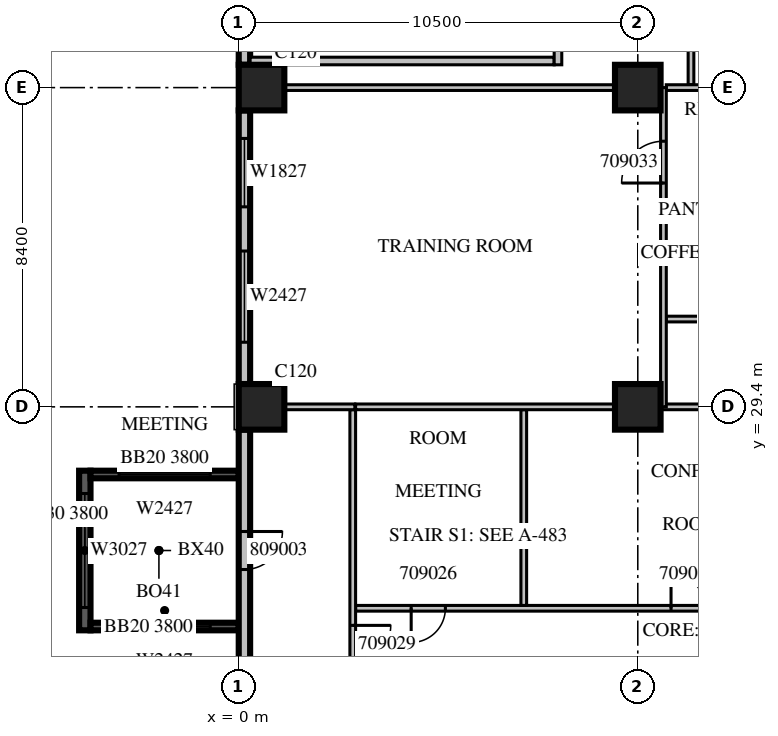
"""IFC4 building model, lengths in metres.
Left out: names, types, materials, properties, quantities, classifications, styles, units other than length and angle.
Written with IfcOpenShell. Run it as: python <this file> out.ifc"""

import sys

from ifc_helpers import new_model, si_unit, direction, frame, frame_2d, origin, origin_2d, place, context, subcontext, project, spatial, rectangle, extrude, source, transform, mapped, element, fill, save


model = new_model("IFC4")
c1 = context("Model", 3, precision=1e-05, world=origin(), true_north=direction((0.0, 1.0)))
c2 = subcontext(c1, "Body", "Model", "MODEL_VIEW")
j1 = project(units=[si_unit("LENGTHUNIT", "METRE"), si_unit("PLANEANGLEUNIT", "RADIAN")], contexts=[c1])
p1 = place(None, origin())
s1 = spatial("IfcSite", under=j1, at=p1, CompositionType="ELEMENT")
p2 = place(p1, origin())
s2 = spatial("IfcBuilding", under=s1, at=p2, CompositionType="ELEMENT")
p3 = place(p2, frame((0.0, 0.0, 48.9)))
s3 = spatial("IfcBuildingStorey", under=s2, at=p3, CompositionType="ELEMENT", Elevation=48.9)
m1 = source(origin(), c2, "Body", "SweptSolid", [
    extrude(rectangle(XDim=1.2, YDim=1.2, at=origin_2d()), origin(), (0.0, 0.0, 1.0), 4.2),
])
for number, where, z_axis, x_axis in (
    (1, (0.6, 29.4, 0.0), (0.0, 0.0, 1.0), (1.0, 0.0, 0.0)),
    (2, (10.5, 29.4, 0.0), (0.0, 0.0, 1.0), (1.0, 0.0, 0.0)),
    (3, (0.6, 37.8, 0.0), (0.0, 0.0, 1.0), (1.0, 0.0, 0.0)),
    (4, (10.5, 37.8, 0.0), (0.0, 0.0, 1.0), (1.0, 0.0, 0.0)),
):
    element("IfcColumn", number, at=place(p3, frame(where, z_axis=z_axis, x_axis=x_axis)), inside=s3, PredefinedType="COLUMN", context=c2, shape_type="MappedRepresentation", body=[
        mapped(m1, transform((0.0, 0.0, 0.0), scale=1.0)),
    ])
p4 = place(p3, frame((-4.05, 27.72, 0.0), z_axis=(0.0, 0.0, 1.0), x_axis=(0.0, -1.0, 0.0)))
e5 = element("IfcWall", 5, at=p4, inside=s3, PredefinedType="SOLIDWALL", context=c2, shape_type="SweptSolid", body=[
    extrude(rectangle(XDim=4.2, YDim=0.3, at=frame_2d((2.1, 0.0))), origin(), (0.0, 0.0, 1.0), 3.8),
])
m2 = source(origin(), c2, "Body", "SweptSolid", [
    extrude(rectangle(XDim=3.0, YDim=2.7, at=frame_2d((1.5, 1.35))), frame((0.0, 0.16, 0.0), z_axis=(0.0, -1.0, 0.0), x_axis=(1.0, 0.0, 0.0)), (0.0, 0.0, 1.0), 0.32),
])
p5 = place(p4, frame((0.6, 0.0, 0.6)))
e6 = element("IfcOpeningElement", 6, at=p5, cuts=e5, PredefinedType="OPENING", context=c2, shape_type="MappedRepresentation", body=[
    mapped(m2, transform((0.0, 0.0, 0.0), scale=1.0)),
])
m3 = source(origin(), c2, "Body", "SweptSolid", [
    extrude(rectangle(XDim=3.9, YDim=0.2, at=frame_2d((1.95, 0.0))), origin(), (0.0, 0.0, 1.0), 3.8),
])
p6 = place(p3, frame((0.0, 27.62, 0.0), z_axis=(0.0, 0.0, 1.0), x_axis=(-1.0, 0.0, 0.0)))
e7 = element("IfcWall", 7, at=p6, inside=s3, PredefinedType="SOLIDWALL", context=c2, shape_type="MappedRepresentation", body=[
    mapped(m3, transform((0.0, 0.0, 0.0), scale=1.0)),
])
m4 = source(origin(), c2, "Body", "SweptSolid", [
    extrude(rectangle(XDim=2.4, YDim=2.7, at=frame_2d((1.2, 1.35))), frame((0.0, 0.11, 0.0), z_axis=(0.0, -1.0, 0.0), x_axis=(1.0, 0.0, 0.0)), (0.0, 0.0, 1.0), 0.22),
])
p7 = place(p6, frame((0.75, 0.0, 0.6)))
e8 = element("IfcOpeningElement", 8, at=p7, cuts=e7, PredefinedType="OPENING", context=c2, shape_type="MappedRepresentation", body=[
    mapped(m4, transform((0.0, 0.0, 0.0), scale=1.0)),
])
p8 = place(p3, frame((0.0, 23.62, 0.0), z_axis=(0.0, 0.0, 1.0), x_axis=(-1.0, 0.0, 0.0)))
e9 = element("IfcWall", 9, at=p8, inside=s3, PredefinedType="SOLIDWALL", context=c2, shape_type="MappedRepresentation", body=[
    mapped(m3, transform((0.0, 0.0, 0.0), scale=1.0)),
])
p9 = place(p8, frame((0.75, 0.0, 0.6)))
e10 = element("IfcOpeningElement", 10, at=p9, cuts=e9, PredefinedType="OPENING", context=c2, shape_type="MappedRepresentation", body=[
    mapped(m4, transform((0.0, 0.0, 0.0), scale=1.0)),
])
m5 = source(origin(), c2, "Body", "SweptSolid", [
    extrude(rectangle(XDim=1.8, YDim=0.3, at=frame_2d((0.9, 0.0))), origin(), (0.0, 0.0, 1.0), 3.8),
])
p10 = place(p3, frame((0.15, 40.2, 0.0), z_axis=(0.0, 0.0, 1.0), x_axis=(0.0, -1.0, 0.0)))
e11 = element("IfcWall", 11, at=p10, inside=s3, PredefinedType="STANDARD", context=c2, shape_type="MappedRepresentation", body=[
    mapped(m5, transform((0.0, 0.0, 0.0), scale=1.0)),
])
m6 = source(origin(), c2, "Body", "SweptSolid", [
    extrude(rectangle(XDim=7.2, YDim=0.3, at=frame_2d((3.6, 0.0))), origin(), (0.0, 0.0, 1.0), 3.8),
])
p11 = place(p3, frame((0.15, 37.2, 0.0), z_axis=(0.0, 0.0, 1.0), x_axis=(0.0, -1.0, 0.0)))
e12 = element("IfcWall", 12, at=p11, inside=s3, PredefinedType="STANDARD", context=c2, shape_type="MappedRepresentation", body=[
    mapped(m6, transform((0.0, 0.0, 0.0), scale=1.0)),
])
m7 = source(origin(), c2, "Body", "SweptSolid", [
    extrude(rectangle(XDim=1.8, YDim=2.7, at=frame_2d((0.9, 1.35))), frame((0.0, 0.16, 0.0), z_axis=(0.0, -1.0, 0.0), x_axis=(1.0, 0.0, 0.0)), (0.0, 0.0, 1.0), 0.32),
])
p12 = place(p11, frame((0.738, 0.0, 0.6)))
e13 = element("IfcOpeningElement", 13, at=p12, cuts=e12, PredefinedType="OPENING", context=c2, shape_type="MappedRepresentation", body=[
    mapped(m7, transform((0.0, 0.0, 0.0), scale=1.0)),
])
m8 = source(origin(), c2, "Body", "SweptSolid", [
    extrude(rectangle(XDim=2.4, YDim=2.7, at=frame_2d((1.2, 1.35))), frame((0.0, 0.16, 0.0), z_axis=(0.0, -1.0, 0.0), x_axis=(1.0, 0.0, 0.0)), (0.0, 0.0, 1.0), 0.32),
])
p13 = place(p11, frame((3.7, 0.0, 0.6)))
e14 = element("IfcOpeningElement", 14, at=p13, cuts=e12, PredefinedType="OPENING", context=c2, shape_type="MappedRepresentation", body=[
    mapped(m8, transform((0.0, 0.0, 0.0), scale=1.0)),
])
p14 = place(p3, frame((0.15, 28.8, 0.0), z_axis=(0.0, 0.0, 1.0), x_axis=(0.0, -1.0, 0.0)))
e15 = element("IfcWall", 15, at=p14, inside=s3, PredefinedType="STANDARD", context=c2, shape_type="MappedRepresentation", body=[
    mapped(m6, transform((0.0, 0.0, 0.0), scale=1.0)),
])
m9 = source(origin(), c2, "Body", "SweptSolid", [
    extrude(rectangle(XDim=1.0, YDim=2.1, at=frame_2d((0.5, 1.05))), frame((0.0, 0.16, 0.0), z_axis=(0.0, -1.0, 0.0), x_axis=(1.0, 0.0, 0.0)), (0.0, 0.0, 1.0), 0.32),
])
p15 = place(p14, frame((2.68, 0.0, 0.0)))
e16 = element("IfcOpeningElement", 16, at=p15, cuts=e15, PredefinedType="OPENING", context=c2, shape_type="MappedRepresentation", body=[
    mapped(m9, transform((0.0, 0.0, 0.0), scale=1.0)),
])
m10 = source(origin(), c2, "Body", "SweptSolid", [
    extrude(rectangle(XDim=8.0, YDim=0.2, at=frame_2d((4.0, 0.0))), origin(), (0.0, 0.0, 1.0), 3.8),
])
p16 = place(p3, frame((0.3, 38.5, 0.0), z_axis=(0.0, 0.0, 1.0), x_axis=(1.0, 0.0, 0.0)))
e17 = element("IfcWall", 17, at=p16, inside=s3, PredefinedType="PARTITIONING", context=c2, shape_type="MappedRepresentation", body=[
    mapped(m10, transform((0.0, 0.0, 0.0), scale=1.0)),
])
m11 = source(origin(), c2, "Body", "SweptSolid", [
    extrude(rectangle(XDim=5.45, YDim=0.2, at=frame_2d((2.725, 0.0))), origin(), (0.0, 0.0, 1.0), 3.8),
])
p17 = place(p3, frame((8.4, 38.4, 0.0), z_axis=(0.0, 0.0, 1.0), x_axis=(0.0, 1.0, 0.0)))
e18 = element("IfcWall", 18, at=p17, inside=s3, PredefinedType="PARTITIONING", context=c2, shape_type="MappedRepresentation", body=[
    mapped(m11, transform((0.0, 0.0, 0.0), scale=1.0)),
])
m12 = source(origin(), c2, "Body", "SweptSolid", [
    extrude(rectangle(XDim=1.2, YDim=2.1, at=frame_2d((0.6, 1.05))), frame((0.0, 0.11, 0.0), z_axis=(0.0, -1.0, 0.0), x_axis=(1.0, 0.0, 0.0)), (0.0, 0.0, 1.0), 0.22),
])
p18 = place(p17, frame((0.4, 0.0, 0.0)))
e19 = element("IfcOpeningElement", 19, at=p18, cuts=e18, PredefinedType="OPENING", context=c2, shape_type="MappedRepresentation", body=[
    mapped(m12, transform((0.0, 0.0, 0.0), scale=1.0)),
])
m13 = source(origin(), c2, "Body", "SweptSolid", [
    extrude(rectangle(XDim=0.9, YDim=2.1, at=frame_2d((0.45, 1.05))), frame((0.0, 0.11, 0.0), z_axis=(0.0, -1.0, 0.0), x_axis=(1.0, 0.0, 0.0)), (0.0, 0.0, 1.0), 0.22),
])
p19 = place(p17, frame((3.25, 0.0, 0.0)))
e20 = element("IfcOpeningElement", 20, at=p19, cuts=e18, PredefinedType="OPENING", context=c2, shape_type="MappedRepresentation", body=[
    mapped(m13, transform((0.0, 0.0, 0.0), scale=1.0)),
])
m14 = source(origin(), c2, "Body", "SweptSolid", [
    extrude(rectangle(XDim=11.925, YDim=0.15, at=frame_2d((5.963, 0.0))), origin(), (0.0, 0.0, 1.0), 3.8),
])
p20 = place(p3, frame((3.075, 24.1, 0.0), z_axis=(0.0, 0.0, 1.0), x_axis=(1.0, 0.0, 0.0)))
e21 = element("IfcWall", 21, at=p20, inside=s3, PredefinedType="PARTITIONING", context=c2, shape_type="MappedRepresentation", body=[
    mapped(m14, transform((0.0, 0.0, 0.0), scale=1.0)),
])
m15 = source(origin(), c2, "Body", "SweptSolid", [
    extrude(rectangle(XDim=0.9, YDim=2.1, at=frame_2d((0.45, 1.05))), frame((0.0, 0.085, 0.0), z_axis=(0.0, -1.0, 0.0), x_axis=(1.0, 0.0, 0.0)), (0.0, 0.0, 1.0), 0.17),
])
p21 = place(p20, frame((1.462, 0.0, 0.0)))
e22 = element("IfcOpeningElement", 22, at=p21, cuts=e21, PredefinedType="OPENING", context=c2, shape_type="MappedRepresentation", body=[
    mapped(m15, transform((0.0, 0.0, 0.0), scale=1.0)),
])
p22 = place(p20, frame((8.3, 0.0, 0.0)))
e23 = element("IfcOpeningElement", 23, at=p22, cuts=e21, PredefinedType="OPENING", context=c2, shape_type="MappedRepresentation", body=[
    mapped(m15, transform((0.0, 0.0, 0.0), scale=1.0)),
])
m16 = source(origin(), c2, "Body", "SweptSolid", [
    extrude(rectangle(XDim=5.15, YDim=0.15, at=frame_2d((2.575, 0.0))), origin(), (0.0, 0.0, 1.0), 3.8),
])
p23 = place(p3, frame((7.5, 24.175, 0.0), z_axis=(0.0, 0.0, 1.0), x_axis=(0.0, 1.0, 0.0)))
e24 = element("IfcWall", 24, at=p23, inside=s3, PredefinedType="PARTITIONING", context=c2, shape_type="MappedRepresentation", body=[
    mapped(m16, transform((0.0, 0.0, 0.0), scale=1.0)),
])
m17 = source(origin(), c2, "Body", "SweptSolid", [
    extrude(rectangle(XDim=6.826, YDim=0.15, at=frame_2d((3.413, 0.0))), origin(), (0.0, 0.0, 1.0), 3.8),
])
p24 = place(p3, frame((9.901, 29.4, 0.0), z_axis=(0.0, 0.0, 1.0), x_axis=(-1.0, 0.0, 0.0)))
e25 = element("IfcWall", 25, at=p24, inside=s3, PredefinedType="PARTITIONING", context=c2, shape_type="MappedRepresentation", body=[
    mapped(m17, transform((0.0, 0.0, 0.0), scale=1.0)),
])
m18 = source(origin(), c2, "Body", "SweptSolid", [
    extrude(rectangle(XDim=3.901, YDim=0.15, at=frame_2d((1.95, 0.0))), origin(), (0.0, 0.0, 1.0), 3.8),
])
p25 = place(p3, frame((15.0, 29.4, 0.0), z_axis=(0.0, 0.0, 1.0), x_axis=(-1.0, 0.0, 0.0)))
e26 = element("IfcWall", 26, at=p25, inside=s3, PredefinedType="PARTITIONING", context=c2, shape_type="MappedRepresentation", body=[
    mapped(m18, transform((0.0, 0.0, 0.0), scale=1.0)),
])
m19 = source(origin(), c2, "Body", "SweptSolid", [
    extrude(rectangle(XDim=7.125, YDim=0.15, at=frame_2d((3.562, 0.0))), origin(), (0.0, 0.0, 1.0), 3.8),
])
p26 = place(p3, frame((3.0, 29.325, 0.0), z_axis=(0.0, 0.0, 1.0), x_axis=(0.0, -1.0, 0.0)))
e27 = element("IfcWall", 27, at=p26, inside=s3, PredefinedType="PARTITIONING", context=c2, shape_type="MappedRepresentation", body=[
    mapped(m19, transform((0.0, 0.0, 0.0), scale=1.0)),
])
m20 = source(origin(), c2, "Body", "SweptSolid", [
    extrude(rectangle(XDim=1.0, YDim=2.1, at=frame_2d((0.5, 1.05))), frame((0.0, 0.085, 0.0), z_axis=(0.0, -1.0, 0.0), x_axis=(1.0, 0.0, 0.0)), (0.0, 0.0, 1.0), 0.17),
])
p27 = place(p26, frame((5.675, 0.0, 0.0)))
e28 = element("IfcOpeningElement", 28, at=p27, cuts=e27, PredefinedType="OPENING", context=c2, shape_type="MappedRepresentation", body=[
    mapped(m20, transform((0.0, 0.0, 0.0), scale=1.0)),
])
m21 = source(origin(), c2, "Body", "SweptSolid", [
    extrude(rectangle(XDim=6.45, YDim=0.15, at=frame_2d((3.225, 0.0))), origin(), (0.0, 0.0, 1.0), 3.8),
])
p28 = place(p3, frame((11.9, 44.325, 0.0), z_axis=(0.0, 0.0, 1.0), x_axis=(0.0, -1.0, 0.0)))
e29 = element("IfcWall", 29, at=p28, inside=s3, PredefinedType="PARTITIONING", context=c2, shape_type="MappedRepresentation", body=[
    mapped(m21, transform((0.0, 0.0, 0.0), scale=1.0)),
])
m22 = source(origin(), c2, "Body", "SweptSolid", [
    extrude(rectangle(XDim=3.75, YDim=0.15, at=frame_2d((1.875, 0.0))), origin(), (0.0, 0.0, 1.0), 3.8),
])
for number, where, z_axis, x_axis in (
    (30, (15.0, 31.71, 0.0), (0.0, 0.0, 1.0), (-1.0, 0.0, 0.0)),
    (31, (15.0, 34.403, 0.0), (0.0, 0.0, 1.0), (-1.0, 0.0, 0.0)),
):
    element("IfcWall", number, at=place(p3, frame(where, z_axis=z_axis, x_axis=x_axis)), inside=s3, PredefinedType="PARTITIONING", context=c2, shape_type="MappedRepresentation", body=[
        mapped(m22, transform((0.0, 0.0, 0.0), scale=1.0)),
    ])
m23 = source(origin(), c2, "Body", "SweptSolid", [
    extrude(rectangle(XDim=1.856, YDim=0.15, at=frame_2d((0.928, 0.0))), origin(), (0.0, 0.0, 1.0), 3.8),
])
p29 = place(p3, frame((3.055, 29.4, 0.0), z_axis=(0.0, 0.0, 1.0), x_axis=(-1.0, 0.0, 0.0)))
e32 = element("IfcWall", 32, at=p29, inside=s3, PredefinedType="PARTITIONING", context=c2, shape_type="MappedRepresentation", body=[
    mapped(m23, transform((0.0, 0.0, 0.0), scale=1.0)),
])
m24 = source(origin(), c2, "Body", "SweptSolid", [
    extrude(rectangle(XDim=8.702, YDim=0.15, at=frame_2d((4.351, 0.0))), origin(), (0.0, 0.0, 1.0), 3.8),
])
p30 = place(p3, frame((9.901, 37.8, 0.0), z_axis=(0.0, 0.0, 1.0), x_axis=(-1.0, 0.0, 0.0)))
e33 = element("IfcWall", 33, at=p30, inside=s3, PredefinedType="PARTITIONING", context=c2, shape_type="MappedRepresentation", body=[
    mapped(m24, transform((0.0, 0.0, 0.0), scale=1.0)),
])
p31 = place(p3, frame((15.0, 37.8, 0.0), z_axis=(0.0, 0.0, 1.0), x_axis=(-1.0, 0.0, 0.0)))
e34 = element("IfcWall", 34, at=p31, inside=s3, PredefinedType="PARTITIONING", context=c2, shape_type="MappedRepresentation", body=[
    mapped(m22, transform((0.0, 0.0, 0.0), scale=1.0)),
])
m25 = source(origin(), c2, "Body", "SweptSolid", [
    extrude(rectangle(XDim=8.4, YDim=0.15, at=frame_2d((4.2, 0.0))), origin(), (0.0, 0.0, 1.0), 3.8),
])
p32 = place(p3, frame((11.175, 29.4, 0.0), z_axis=(0.0, 0.0, 1.0), x_axis=(0.0, 1.0, 0.0)))
e35 = element("IfcWall", 35, at=p32, inside=s3, PredefinedType="PARTITIONING", context=c2, shape_type="MappedRepresentation", body=[
    mapped(m25, transform((0.0, 0.0, 0.0), scale=1.0)),
])
m26 = source(origin(), c2, "Body", "SweptSolid", [
    extrude(rectangle(XDim=1.1, YDim=2.1, at=frame_2d((0.55, 1.05))), frame((0.0, 0.085, 0.0), z_axis=(0.0, -1.0, 0.0), x_axis=(1.0, 0.0, 0.0)), (0.0, 0.0, 1.0), 0.17),
])
p33 = place(p32, frame((5.889, 0.0, 0.0)))
e36 = element("IfcOpeningElement", 36, at=p33, cuts=e35, PredefinedType="OPENING", context=c2, shape_type="MappedRepresentation", body=[
    mapped(m26, transform((0.0, 0.0, 0.0), scale=1.0)),
])
m27 = source(origin(), c2, "Body", "SweptSolid", [
    extrude(rectangle(XDim=3.0, YDim=2.7, at=frame_2d((1.5, 1.35))), frame((0.0, 0.03, 0.0), z_axis=(0.0, -1.0, 0.0), x_axis=(1.0, 0.0, 0.0)), (0.0, 0.0, 1.0), 0.06),
])
p34 = place(p5, origin())
e37 = element("IfcWindow", 37, at=p34, inside=s3, PartitioningType="SINGLE_PANEL", PredefinedType="WINDOW", context=c2, shape_type="MappedRepresentation", body=[
    mapped(m27, transform((0.0, 0.0, 0.0), scale=1.0)),
])
fill(e6, e37)
m28 = source(origin(), c2, "Body", "SweptSolid", [
    extrude(rectangle(XDim=2.4, YDim=2.7, at=frame_2d((1.2, 1.35))), frame((0.0, 0.03, 0.0), z_axis=(0.0, -1.0, 0.0), x_axis=(1.0, 0.0, 0.0)), (0.0, 0.0, 1.0), 0.06),
])
p35 = place(p7, origin())
e38 = element("IfcWindow", 38, at=p35, inside=s3, PartitioningType="SINGLE_PANEL", PredefinedType="WINDOW", context=c2, shape_type="MappedRepresentation", body=[
    mapped(m28, transform((0.0, 0.0, 0.0), scale=1.0)),
])
fill(e8, e38)
p36 = place(p9, origin())
e39 = element("IfcWindow", 39, at=p36, inside=s3, PartitioningType="SINGLE_PANEL", PredefinedType="WINDOW", context=c2, shape_type="MappedRepresentation", body=[
    mapped(m28, transform((0.0, 0.0, 0.0), scale=1.0)),
])
fill(e10, e39)
m29 = source(origin(), c2, "Body", "SweptSolid", [
    extrude(rectangle(XDim=1.8, YDim=2.7, at=frame_2d((0.9, 1.35))), frame((0.0, 0.03, 0.0), z_axis=(0.0, -1.0, 0.0), x_axis=(1.0, 0.0, 0.0)), (0.0, 0.0, 1.0), 0.06),
])
p37 = place(p12, origin())
e40 = element("IfcWindow", 40, at=p37, inside=s3, PartitioningType="SINGLE_PANEL", PredefinedType="WINDOW", context=c2, shape_type="MappedRepresentation", body=[
    mapped(m29, transform((0.0, 0.0, 0.0), scale=1.0)),
])
fill(e13, e40)
p38 = place(p13, origin())
e41 = element("IfcWindow", 41, at=p38, inside=s3, PartitioningType="SINGLE_PANEL", PredefinedType="WINDOW", context=c2, shape_type="MappedRepresentation", body=[
    mapped(m28, transform((0.0, 0.0, 0.0), scale=1.0)),
])
fill(e14, e41)
m30 = source(origin(), c2, "Body", "SweptSolid", [
    extrude(rectangle(XDim=0.9, YDim=2.1, at=frame_2d((0.45, 1.05))), frame((0.0, 0.025, 0.0), z_axis=(0.0, -1.0, 0.0), x_axis=(1.0, 0.0, 0.0)), (0.0, 0.0, 1.0), 0.05),
])
p39 = place(p21, origin())
e42 = element("IfcDoor", 42, at=p39, inside=s3, OperationType="SINGLE_SWING_RIGHT", PredefinedType="DOOR", context=c2, shape_type="MappedRepresentation", body=[
    mapped(m30, transform((0.0, 0.0, 0.0), scale=1.0)),
])
fill(e22, e42)
p40 = place(p22, origin())
e43 = element("IfcDoor", 43, at=p40, inside=s3, OperationType="SINGLE_SWING_LEFT", PredefinedType="DOOR", context=c2, shape_type="MappedRepresentation", body=[
    mapped(m30, transform((0.0, 0.0, 0.0), scale=1.0)),
])
fill(e23, e43)
m31 = source(origin(), c2, "Body", "SweptSolid", [
    extrude(rectangle(XDim=1.0, YDim=2.1, at=frame_2d((0.5, 1.05))), frame((0.0, 0.025, 0.0), z_axis=(0.0, -1.0, 0.0), x_axis=(1.0, 0.0, 0.0)), (0.0, 0.0, 1.0), 0.05),
])
p41 = place(p27, origin())
e44 = element("IfcDoor", 44, at=p41, inside=s3, OperationType="SINGLE_SWING_LEFT", PredefinedType="DOOR", context=c2, shape_type="MappedRepresentation", body=[
    mapped(m31, transform((0.0, 0.0, 0.0), scale=1.0)),
])
fill(e28, e44)
m32 = source(origin(), c2, "Body", "SweptSolid", [
    extrude(rectangle(XDim=1.1, YDim=2.1, at=frame_2d((0.55, 1.05))), frame((0.0, 0.025, 0.0), z_axis=(0.0, -1.0, 0.0), x_axis=(1.0, 0.0, 0.0)), (0.0, 0.0, 1.0), 0.05),
])
p42 = place(p33, origin())
e45 = element("IfcDoor", 45, at=p42, inside=s3, OperationType="SINGLE_SWING_LEFT", PredefinedType="DOOR", context=c2, shape_type="MappedRepresentation", body=[
    mapped(m32, transform((0.0, 0.0, 0.0), scale=1.0)),
])
fill(e36, e45)
p43 = place(p15, origin())
e46 = element("IfcDoor", 46, at=p43, inside=s3, OperationType="SINGLE_SWING_LEFT", PredefinedType="DOOR", context=c2, shape_type="MappedRepresentation", body=[
    mapped(m31, transform((0.0, 0.0, 0.0), scale=1.0)),
])
fill(e16, e46)
save(model, sys.argv[1])
